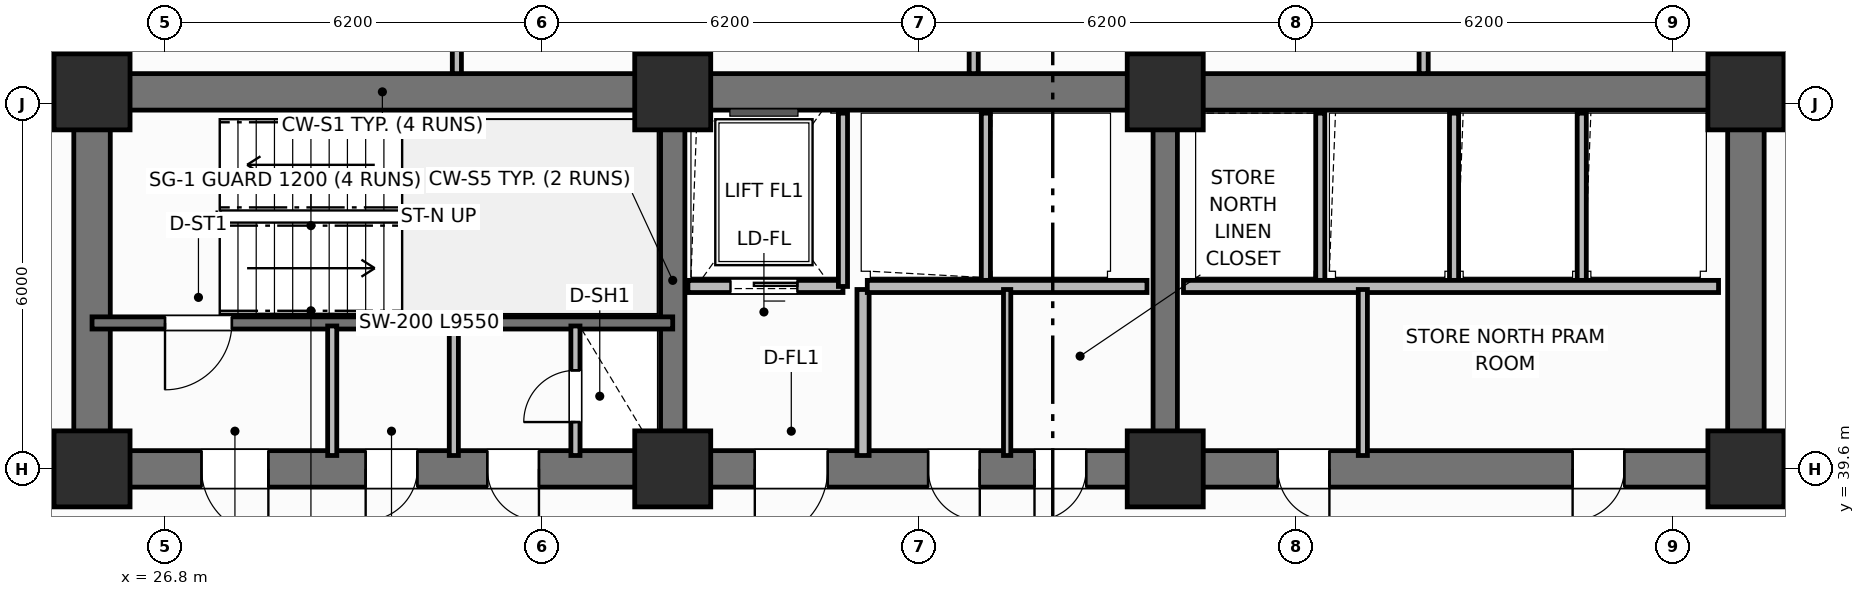
"""IFC4 building model, lengths in metres.
Left out: names, types, materials, properties, quantities, classifications, styles, units other than length and angle.
Written with IfcOpenShell. Run it as: python <this file> out.ifc"""

import sys

from ifc_helpers import new_model, si_unit, direction, frame, frame_2d, origin, origin_2d, place, context, subcontext, project, spatial, rectangle, extrude, element, fill, save


model = new_model("IFC4")
c1 = context("Model", 3, precision=1e-05, world=origin(), true_north=direction((0.0, 1.0)))
c2 = subcontext(c1, "Body", "Model", "MODEL_VIEW")
j1 = project(units=[si_unit("LENGTHUNIT", "METRE"), si_unit("PLANEANGLEUNIT", "RADIAN")], contexts=[c1])
p1 = place(None, origin())
s1 = spatial("IfcSite", under=j1, at=p1, CompositionType="ELEMENT")
p2 = place(p1, origin())
s2 = spatial("IfcBuilding", under=s1, at=p2, CompositionType="ELEMENT")
p3 = place(p2, frame((0.0, 0.0, 43.6)))
s3 = spatial("IfcBuildingStorey", under=s2, at=p3, CompositionType="ELEMENT", Elevation=43.6)
p4 = place(p3, frame((25.6, 45.8, 0.0), z_axis=(0.0, 0.0, 1.0), x_axis=(1.0, 0.0, 0.0)))
e1 = element("IfcWall", 1, at=p4, inside=s3, PredefinedType="SHEAR", context=c2, shape_type="SweptSolid", body=[
    extrude(rectangle(XDim=27.2, YDim=0.6, at=frame_2d((13.6, 0.0))), origin(), (0.0, 0.0, 1.0), 3.7),
])
for number, where, z_axis, x_axis in (
    (2, (25.6, 39.9, 0.0), (0.0, 0.0, 1.0), (0.0, 1.0, 0.0)),
    (3, (52.8, 39.9, 0.0), (0.0, 0.0, 1.0), (0.0, 1.0, 0.0)),
):
    element("IfcWall", number, at=place(p3, frame(where, z_axis=z_axis, x_axis=x_axis)), inside=s3, PredefinedType="SHEAR", context=c2, shape_type="SweptSolid", body=[
        extrude(rectangle(XDim=5.6, YDim=0.6, at=frame_2d((2.8, 0.0))), origin(), (0.0, 0.0, 1.0), 3.7),
    ])
p5 = place(p3, frame((52.8, 39.6, 0.0), z_axis=(0.0, 0.0, 1.0), x_axis=(-1.0, 0.0, 0.0)))
e4 = element("IfcWall", 4, at=p5, inside=s3, PredefinedType="SHEAR", context=c2, shape_type="SweptSolid", body=[
    extrude(rectangle(XDim=27.2, YDim=0.6, at=frame_2d((13.6, 0.0))), origin(), (0.0, 0.0, 1.0), 3.7),
])
p6 = place(p5, frame((24.3, 0.0, 0.0)))
e5 = element("IfcOpeningElement", 5, at=p6, cuts=e4, PredefinedType="OPENING", context=c2, shape_type="SweptSolid", body=[
    extrude(rectangle(XDim=1.1, YDim=2.15, at=frame_2d((0.55, 1.075))), frame((0.0, 0.31, 0.0), z_axis=(0.0, -1.0, 0.0), x_axis=(1.0, 0.0, 0.0)), (0.0, 0.0, 1.0), 0.62),
])
p7 = place(p5, frame((21.85, 0.0, 0.0)))
e6 = element("IfcOpeningElement", 6, at=p7, cuts=e4, PredefinedType="OPENING", context=c2, shape_type="SweptSolid", body=[
    extrude(rectangle(XDim=0.85, YDim=2.1, at=frame_2d((0.425, 1.05))), frame((0.0, 0.31, 0.0), z_axis=(0.0, -1.0, 0.0), x_axis=(1.0, 0.0, 0.0)), (0.0, 0.0, 1.0), 0.62),
])
p8 = place(p5, frame((19.85, 0.0, 0.0)))
e7 = element("IfcOpeningElement", 7, at=p8, cuts=e4, PredefinedType="OPENING", context=c2, shape_type="SweptSolid", body=[
    extrude(rectangle(XDim=0.85, YDim=2.1, at=frame_2d((0.425, 1.05))), frame((0.0, 0.31, 0.0), z_axis=(0.0, -1.0, 0.0), x_axis=(1.0, 0.0, 0.0)), (0.0, 0.0, 1.0), 0.62),
])
p9 = place(p5, frame((15.1, 0.0, 0.0)))
e8 = element("IfcOpeningElement", 8, at=p9, cuts=e4, PredefinedType="OPENING", context=c2, shape_type="SweptSolid", body=[
    extrude(rectangle(XDim=1.2, YDim=2.15, at=frame_2d((0.6, 1.075))), frame((0.0, 0.31, 0.0), z_axis=(0.0, -1.0, 0.0), x_axis=(1.0, 0.0, 0.0)), (0.0, 0.0, 1.0), 0.62),
])
p10 = place(p5, frame((12.6, 0.0, 0.0)))
e9 = element("IfcOpeningElement", 9, at=p10, cuts=e4, PredefinedType="OPENING", context=c2, shape_type="SweptSolid", body=[
    extrude(rectangle(XDim=0.85, YDim=2.1, at=frame_2d((0.425, 1.05))), frame((0.0, 0.31, 0.0), z_axis=(0.0, -1.0, 0.0), x_axis=(1.0, 0.0, 0.0)), (0.0, 0.0, 1.0), 0.62),
])
p11 = place(p5, frame((10.85, 0.0, 0.0)))
e10 = element("IfcOpeningElement", 10, at=p11, cuts=e4, PredefinedType="OPENING", context=c2, shape_type="SweptSolid", body=[
    extrude(rectangle(XDim=0.85, YDim=2.1, at=frame_2d((0.425, 1.05))), frame((0.0, 0.31, 0.0), z_axis=(0.0, -1.0, 0.0), x_axis=(1.0, 0.0, 0.0)), (0.0, 0.0, 1.0), 0.62),
])
p12 = place(p5, frame((6.85, 0.0, 0.0)))
e11 = element("IfcOpeningElement", 11, at=p12, cuts=e4, PredefinedType="OPENING", context=c2, shape_type="SweptSolid", body=[
    extrude(rectangle(XDim=0.85, YDim=2.1, at=frame_2d((0.425, 1.05))), frame((0.0, 0.31, 0.0), z_axis=(0.0, -1.0, 0.0), x_axis=(1.0, 0.0, 0.0)), (0.0, 0.0, 1.0), 0.62),
])
p13 = place(p5, frame((2.0, 0.0, 0.0)))
e12 = element("IfcOpeningElement", 12, at=p13, cuts=e4, PredefinedType="OPENING", context=c2, shape_type="SweptSolid", body=[
    extrude(rectangle(XDim=0.85, YDim=2.1, at=frame_2d((0.425, 1.05))), frame((0.0, 0.31, 0.0), z_axis=(0.0, -1.0, 0.0), x_axis=(1.0, 0.0, 0.0)), (0.0, 0.0, 1.0), 0.62),
])
for number, where, z_axis, x_axis in (
    (13, (35.15, 39.9, 0.0), (0.0, 0.0, 1.0), (0.0, 1.0, 0.0)),
    (14, (43.25, 39.9, 0.0), (0.0, 0.0, 1.0), (0.0, 1.0, 0.0)),
):
    element("IfcWall", number, at=place(p3, frame(where, z_axis=z_axis, x_axis=x_axis)), inside=s3, PredefinedType="SHEAR", context=c2, shape_type="SweptSolid", body=[
        extrude(rectangle(XDim=5.6, YDim=0.4, at=frame_2d((2.8, 0.0))), origin(), (0.0, 0.0, 1.0), 3.7),
    ])
for number, where, z_axis, x_axis in (
    (15, (25.6, 39.6, 0.0), (0.0, 0.0, 1.0), (1.0, 0.0, 0.0)),
    (16, (25.6, 45.8, 0.0), (0.0, 0.0, 1.0), (1.0, 0.0, 0.0)),
    (17, (35.15, 39.6, 0.0), (0.0, 0.0, 1.0), (1.0, 0.0, 0.0)),
    (18, (35.15, 45.8, 0.0), (0.0, 0.0, 1.0), (1.0, 0.0, 0.0)),
    (19, (43.25, 39.6, 0.0), (0.0, 0.0, 1.0), (1.0, 0.0, 0.0)),
    (20, (43.25, 45.8, 0.0), (0.0, 0.0, 1.0), (1.0, 0.0, 0.0)),
    (21, (52.8, 39.6, 0.0), (0.0, 0.0, 1.0), (1.0, 0.0, 0.0)),
    (22, (52.8, 45.8, 0.0), (0.0, 0.0, 1.0), (1.0, 0.0, 0.0)),
):
    element("IfcColumn", number, at=place(p3, frame(where, z_axis=z_axis, x_axis=x_axis)), inside=s3, PredefinedType="COLUMN", context=c2, shape_type="SweptSolid", body=[
        extrude(rectangle(XDim=1.25, YDim=1.25, at=origin_2d()), origin(), (0.0, 0.0, 1.0), 3.7),
    ])
p14 = place(p3, frame((35.15, 42.0, 0.0), z_axis=(0.0, 0.0, 1.0), x_axis=(-1.0, 0.0, 0.0)))
e23 = element("IfcWall", 23, at=p14, inside=s3, PredefinedType="SHEAR", context=c2, shape_type="SweptSolid", body=[
    extrude(rectangle(XDim=9.55, YDim=0.2, at=frame_2d((4.775, 0.0))), origin(), (0.0, 0.0, 1.0), 3.7),
])
p15 = place(p14, frame((7.25, 0.0, 0.0)))
e24 = element("IfcOpeningElement", 24, at=p15, cuts=e23, PredefinedType="OPENING", context=c2, shape_type="SweptSolid", body=[
    extrude(rectangle(XDim=1.1, YDim=2.15, at=frame_2d((0.55, 1.075))), frame((0.0, 0.11, 0.0), z_axis=(0.0, -1.0, 0.0), x_axis=(1.0, 0.0, 0.0)), (0.0, 0.0, 1.0), 0.22),
])
p16 = place(p3, frame((33.55, 39.82, 0.0), z_axis=(0.0, 0.0, 1.0), x_axis=(0.0, 1.0, 0.0)))
e25 = element("IfcWall", 25, at=p16, inside=s3, PredefinedType="PARTITIONING", context=c2, shape_type="SweptSolid", body=[
    extrude(rectangle(XDim=2.13, YDim=0.15, at=frame_2d((1.065, 0.0))), origin(), (0.0, 0.0, 1.0), 2.53),
])
p17 = place(p16, frame((0.55, 0.0, 0.0)))
e26 = element("IfcOpeningElement", 26, at=p17, cuts=e25, PredefinedType="OPENING", context=c2, shape_type="SweptSolid", body=[
    extrude(rectangle(XDim=0.85, YDim=2.05, at=frame_2d((0.425, 1.025))), frame((0.0, 0.085, 0.0), z_axis=(0.0, -1.0, 0.0), x_axis=(1.0, 0.0, 0.0)), (0.0, 0.0, 1.0), 0.17),
])
for number, where, z_axis, x_axis in (
    (27, (29.55, 39.82, 0.0), (0.0, 0.0, 1.0), (0.0, 1.0, 0.0)),
    (28, (31.55, 39.82, 0.0), (0.0, 0.0, 1.0), (0.0, 1.0, 0.0)),
):
    element("IfcWall", number, at=place(p3, frame(where, z_axis=z_axis, x_axis=x_axis)), inside=s3, PredefinedType="PARTITIONING", context=c2, shape_type="SweptSolid", body=[
        extrude(rectangle(XDim=2.13, YDim=0.15, at=frame_2d((1.065, 0.0))), origin(), (0.0, 0.0, 1.0), 2.53),
    ])
p18 = place(p3, frame((37.95, 42.6, 0.0), z_axis=(0.0, 0.0, 1.0), x_axis=(-1.0, 0.0, 0.0)))
e29 = element("IfcWall", 29, at=p18, inside=s3, PredefinedType="PARTITIONING", context=c2, shape_type="SweptSolid", body=[
    extrude(rectangle(XDim=2.55, YDim=0.2, at=frame_2d((1.275, 0.0))), origin(), (0.0, 0.0, 1.0), 2.3),
])
p19 = place(p18, frame((0.75, 0.0, 0.0)))
e30 = element("IfcOpeningElement", 30, at=p19, cuts=e29, PredefinedType="OPENING", context=c2, shape_type="SweptSolid", body=[
    extrude(rectangle(XDim=1.1, YDim=2.15, at=frame_2d((0.55, 1.075))), frame((0.0, 0.11, 0.0), z_axis=(0.0, -1.0, 0.0), x_axis=(1.0, 0.0, 0.0)), (0.0, 0.0, 1.0), 0.22),
])
p20 = place(p3, frame((37.95, 42.6, 0.0), z_axis=(0.0, 0.0, 1.0), x_axis=(0.0, 1.0, 0.0)))
e31 = element("IfcWall", 31, at=p20, inside=s3, PredefinedType="PARTITIONING", context=c2, shape_type="SweptSolid", body=[
    extrude(rectangle(XDim=2.85, YDim=0.15, at=frame_2d((1.425, 0.0))), origin(), (0.0, 0.0, 1.0), 2.53),
])
p21 = place(p3, frame((38.28, 39.82, 0.0), z_axis=(0.0, 0.0, 1.0), x_axis=(0.0, 1.0, 0.0)))
e32 = element("IfcWall", 32, at=p21, inside=s3, PredefinedType="PARTITIONING", context=c2, shape_type="SweptSolid", body=[
    extrude(rectangle(XDim=2.73, YDim=0.2, at=frame_2d((1.365, 0.0))), origin(), (0.0, 0.0, 1.0), 2.53),
])
p22 = place(p3, frame((40.3, 42.65, 0.0), z_axis=(0.0, 0.0, 1.0), x_axis=(0.0, 1.0, 0.0)))
e33 = element("IfcWall", 33, at=p22, inside=s3, PredefinedType="PARTITIONING", context=c2, shape_type="SweptSolid", body=[
    extrude(rectangle(XDim=2.8, YDim=0.15, at=frame_2d((1.4, 0.0))), origin(), (0.0, 0.0, 1.0), 2.53),
])
p23 = place(p3, frame((42.95, 42.6, 0.0), z_axis=(0.0, 0.0, 1.0), x_axis=(-1.0, 0.0, 0.0)))
e34 = element("IfcWall", 34, at=p23, inside=s3, PredefinedType="PARTITIONING", context=c2, shape_type="SweptSolid", body=[
    extrude(rectangle(XDim=4.6, YDim=0.2, at=frame_2d((2.3, 0.0))), origin(), (0.0, 0.0, 1.0), 2.3),
])
p24 = place(p3, frame((40.65, 39.82, 0.0), z_axis=(0.0, 0.0, 1.0), x_axis=(0.0, 1.0, 0.0)))
e35 = element("IfcWall", 35, at=p24, inside=s3, PredefinedType="PARTITIONING", context=c2, shape_type="SweptSolid", body=[
    extrude(rectangle(XDim=2.73, YDim=0.12, at=frame_2d((1.365, 0.0))), origin(), (0.0, 0.0, 1.0), 2.53),
])
for number, where, z_axis, x_axis in (
    (36, (45.8, 42.65, 0.0), (0.0, 0.0, 1.0), (0.0, 1.0, 0.0)),
    (37, (48.0, 42.65, 0.0), (0.0, 0.0, 1.0), (0.0, 1.0, 0.0)),
    (38, (50.1, 42.65, 0.0), (0.0, 0.0, 1.0), (0.0, 1.0, 0.0)),
):
    element("IfcWall", number, at=place(p3, frame(where, z_axis=z_axis, x_axis=x_axis)), inside=s3, PredefinedType="PARTITIONING", context=c2, shape_type="SweptSolid", body=[
        extrude(rectangle(XDim=2.8, YDim=0.15, at=frame_2d((1.4, 0.0))), origin(), (0.0, 0.0, 1.0), 2.53),
    ])
p25 = place(p3, frame((52.35, 42.6, 0.0), z_axis=(0.0, 0.0, 1.0), x_axis=(-1.0, 0.0, 0.0)))
e39 = element("IfcWall", 39, at=p25, inside=s3, PredefinedType="PARTITIONING", context=c2, shape_type="SweptSolid", body=[
    extrude(rectangle(XDim=8.8, YDim=0.2, at=frame_2d((4.4, 0.0))), origin(), (0.0, 0.0, 1.0), 2.53),
])
p26 = place(p3, frame((46.5, 39.82, 0.0), z_axis=(0.0, 0.0, 1.0), x_axis=(0.0, 1.0, 0.0)))
e40 = element("IfcWall", 40, at=p26, inside=s3, PredefinedType="PARTITIONING", context=c2, shape_type="SweptSolid", body=[
    extrude(rectangle(XDim=2.73, YDim=0.15, at=frame_2d((1.365, 0.0))), origin(), (0.0, 0.0, 1.0), 2.53),
])
p27 = place(p3, frame((31.6, 46.1, 0.0), z_axis=(0.0, 0.0, 1.0), x_axis=(0.0, 1.0, 0.0)))
e41 = element("IfcWall", 41, at=p27, inside=s3, PredefinedType="PARTITIONING", context=c2, shape_type="SweptSolid", body=[
    extrude(rectangle(XDim=5.33, YDim=0.15, at=frame_2d((2.665, 0.0))), origin(), (0.0, 0.0, 1.0), 2.53),
])
p28 = place(p27, frame((0.85, 0.0, 0.0)))
e42 = element("IfcOpeningElement", 42, at=p28, cuts=e41, PredefinedType="OPENING", context=c2, shape_type="SweptSolid", body=[
    extrude(rectangle(XDim=0.9, YDim=2.1, at=frame_2d((0.45, 1.05))), frame((0.0, 0.085, 0.0), z_axis=(0.0, -1.0, 0.0), x_axis=(1.0, 0.0, 0.0)), (0.0, 0.0, 1.0), 0.17),
])
p29 = place(p3, frame((40.1, 46.1, 0.0), z_axis=(0.0, 0.0, 1.0), x_axis=(0.0, 1.0, 0.0)))
e43 = element("IfcWall", 43, at=p29, inside=s3, PredefinedType="PARTITIONING", context=c2, shape_type="SweptSolid", body=[
    extrude(rectangle(XDim=5.33, YDim=0.15, at=frame_2d((2.665, 0.0))), origin(), (0.0, 0.0, 1.0), 2.53),
])
p30 = place(p3, frame((47.5, 46.1, 0.0), z_axis=(0.0, 0.0, 1.0), x_axis=(0.0, 1.0, 0.0)))
e44 = element("IfcWall", 44, at=p30, inside=s3, PredefinedType="PARTITIONING", context=c2, shape_type="SweptSolid", body=[
    extrude(rectangle(XDim=5.33, YDim=0.15, at=frame_2d((2.665, 0.0))), origin(), (0.0, 0.0, 1.0), 2.53),
])
p31 = place(p30, frame((0.85, 0.0, 0.0)))
e45 = element("IfcOpeningElement", 45, at=p31, cuts=e44, PredefinedType="OPENING", context=c2, shape_type="SweptSolid", body=[
    extrude(rectangle(XDim=0.9, YDim=2.1, at=frame_2d((0.45, 1.05))), frame((0.0, 0.085, 0.0), z_axis=(0.0, -1.0, 0.0), x_axis=(1.0, 0.0, 0.0)), (0.0, 0.0, 1.0), 0.17),
])
p32 = place(p3, frame((25.4, 46.1, 0.0), z_axis=(0.0, 0.0, 1.0), x_axis=(0.0, 1.0, 0.0)))
e46 = element("IfcWall", 46, at=p32, inside=s3, PredefinedType="PARTITIONING", context=c2, shape_type="SweptSolid", body=[
    extrude(rectangle(XDim=4.38, YDim=0.2, at=frame_2d((2.19, 0.0))), origin(), (0.0, 0.0, 1.0), 2.53),
])
p33 = place(p32, frame((1.05, 0.0, 0.0)))
e47 = element("IfcOpeningElement", 47, at=p33, cuts=e46, PredefinedType="OPENING", context=c2, shape_type="SweptSolid", body=[
    extrude(rectangle(XDim=0.9, YDim=2.1, at=frame_2d((0.45, 1.05))), frame((0.0, 0.11, 0.0), z_axis=(0.0, -1.0, 0.0), x_axis=(1.0, 0.0, 0.0)), (0.0, 0.0, 1.0), 0.22),
])
p34 = place(p3, frame((53.0, 46.1, 0.0), z_axis=(0.0, 0.0, 1.0), x_axis=(0.0, 1.0, 0.0)))
e48 = element("IfcWall", 48, at=p34, inside=s3, PredefinedType="PARTITIONING", context=c2, shape_type="SweptSolid", body=[
    extrude(rectangle(XDim=4.38, YDim=0.2, at=frame_2d((2.19, 0.0))), origin(), (0.0, 0.0, 1.0), 2.53),
])
p35 = place(p34, frame((1.05, 0.0, 0.0)))
e49 = element("IfcOpeningElement", 49, at=p35, cuts=e48, PredefinedType="OPENING", context=c2, shape_type="SweptSolid", body=[
    extrude(rectangle(XDim=0.9, YDim=2.1, at=frame_2d((0.45, 1.05))), frame((0.0, 0.11, 0.0), z_axis=(0.0, -1.0, 0.0), x_axis=(1.0, 0.0, 0.0)), (0.0, 0.0, 1.0), 0.22),
])
p36 = place(p15, origin())
e50 = element("IfcDoor", 50, at=p36, inside=s3, OperationType="SINGLE_SWING_RIGHT", PredefinedType="DOOR", context=c2, shape_type="SweptSolid", body=[
    extrude(rectangle(XDim=1.1, YDim=2.15, at=frame_2d((0.55, 1.075))), frame((0.0, 0.025, 0.0), z_axis=(0.0, -1.0, 0.0), x_axis=(1.0, 0.0, 0.0)), (0.0, 0.0, 1.0), 0.05),
])
fill(e24, e50)
p37 = place(p17, origin())
e51 = element("IfcDoor", 51, at=p37, inside=s3, OperationType="SINGLE_SWING_LEFT", PredefinedType="TRAPDOOR", context=c2, shape_type="SweptSolid", body=[
    extrude(rectangle(XDim=0.85, YDim=2.05, at=frame_2d((0.425, 1.025))), frame((0.0, 0.025, 0.0), z_axis=(0.0, -1.0, 0.0), x_axis=(1.0, 0.0, 0.0)), (0.0, 0.0, 1.0), 0.05),
])
fill(e26, e51)
p38 = place(p19, origin())
e52 = element("IfcDoor", 52, at=p38, inside=s3, OperationType="SLIDING_TO_LEFT", PredefinedType="DOOR", context=c2, shape_type="SweptSolid", body=[
    extrude(rectangle(XDim=1.1, YDim=2.15, at=frame_2d((0.55, 1.075))), frame((0.0, 0.025, 0.0), z_axis=(0.0, -1.0, 0.0), x_axis=(1.0, 0.0, 0.0)), (0.0, 0.0, 1.0), 0.05),
])
fill(e30, e52)
p39 = place(p6, origin())
e53 = element("IfcDoor", 53, at=p39, inside=s3, OperationType="SINGLE_SWING_LEFT", PredefinedType="DOOR", context=c2, shape_type="SweptSolid", body=[
    extrude(rectangle(XDim=1.1, YDim=2.15, at=frame_2d((0.55, 1.075))), frame((0.0, 0.025, 0.0), z_axis=(0.0, -1.0, 0.0), x_axis=(1.0, 0.0, 0.0)), (0.0, 0.0, 1.0), 0.05),
])
fill(e5, e53)
p40 = place(p7, origin())
e54 = element("IfcDoor", 54, at=p40, inside=s3, OperationType="SINGLE_SWING_RIGHT", PredefinedType="DOOR", context=c2, shape_type="SweptSolid", body=[
    extrude(rectangle(XDim=0.85, YDim=2.1, at=frame_2d((0.425, 1.05))), frame((0.0, 0.025, 0.0), z_axis=(0.0, -1.0, 0.0), x_axis=(1.0, 0.0, 0.0)), (0.0, 0.0, 1.0), 0.05),
])
fill(e6, e54)
p41 = place(p8, origin())
e55 = element("IfcDoor", 55, at=p41, inside=s3, OperationType="SINGLE_SWING_LEFT", PredefinedType="DOOR", context=c2, shape_type="SweptSolid", body=[
    extrude(rectangle(XDim=0.85, YDim=2.1, at=frame_2d((0.425, 1.05))), frame((0.0, 0.025, 0.0), z_axis=(0.0, -1.0, 0.0), x_axis=(1.0, 0.0, 0.0)), (0.0, 0.0, 1.0), 0.05),
])
fill(e7, e55)
p42 = place(p9, origin())
e56 = element("IfcDoor", 56, at=p42, inside=s3, OperationType="SINGLE_SWING_RIGHT", PredefinedType="DOOR", context=c2, shape_type="SweptSolid", body=[
    extrude(rectangle(XDim=1.2, YDim=2.15, at=frame_2d((0.6, 1.075))), frame((0.0, 0.025, 0.0), z_axis=(0.0, -1.0, 0.0), x_axis=(1.0, 0.0, 0.0)), (0.0, 0.0, 1.0), 0.05),
])
fill(e8, e56)
p43 = place(p10, origin())
e57 = element("IfcDoor", 57, at=p43, inside=s3, OperationType="SINGLE_SWING_LEFT", PredefinedType="DOOR", context=c2, shape_type="SweptSolid", body=[
    extrude(rectangle(XDim=0.85, YDim=2.1, at=frame_2d((0.425, 1.05))), frame((0.0, 0.025, 0.0), z_axis=(0.0, -1.0, 0.0), x_axis=(1.0, 0.0, 0.0)), (0.0, 0.0, 1.0), 0.05),
])
fill(e9, e57)
p44 = place(p11, origin())
e58 = element("IfcDoor", 58, at=p44, inside=s3, OperationType="SINGLE_SWING_RIGHT", PredefinedType="DOOR", context=c2, shape_type="SweptSolid", body=[
    extrude(rectangle(XDim=0.85, YDim=2.1, at=frame_2d((0.425, 1.05))), frame((0.0, 0.025, 0.0), z_axis=(0.0, -1.0, 0.0), x_axis=(1.0, 0.0, 0.0)), (0.0, 0.0, 1.0), 0.05),
])
fill(e10, e58)
p45 = place(p12, origin())
e59 = element("IfcDoor", 59, at=p45, inside=s3, OperationType="SINGLE_SWING_LEFT", PredefinedType="DOOR", context=c2, shape_type="SweptSolid", body=[
    extrude(rectangle(XDim=0.85, YDim=2.1, at=frame_2d((0.425, 1.05))), frame((0.0, 0.025, 0.0), z_axis=(0.0, -1.0, 0.0), x_axis=(1.0, 0.0, 0.0)), (0.0, 0.0, 1.0), 0.05),
])
fill(e11, e59)
p46 = place(p13, origin())
e60 = element("IfcDoor", 60, at=p46, inside=s3, OperationType="SINGLE_SWING_RIGHT", PredefinedType="DOOR", context=c2, shape_type="SweptSolid", body=[
    extrude(rectangle(XDim=0.85, YDim=2.1, at=frame_2d((0.425, 1.05))), frame((0.0, 0.025, 0.0), z_axis=(0.0, -1.0, 0.0), x_axis=(1.0, 0.0, 0.0)), (0.0, 0.0, 1.0), 0.05),
])
fill(e12, e60)
save(model, sys.argv[1])
